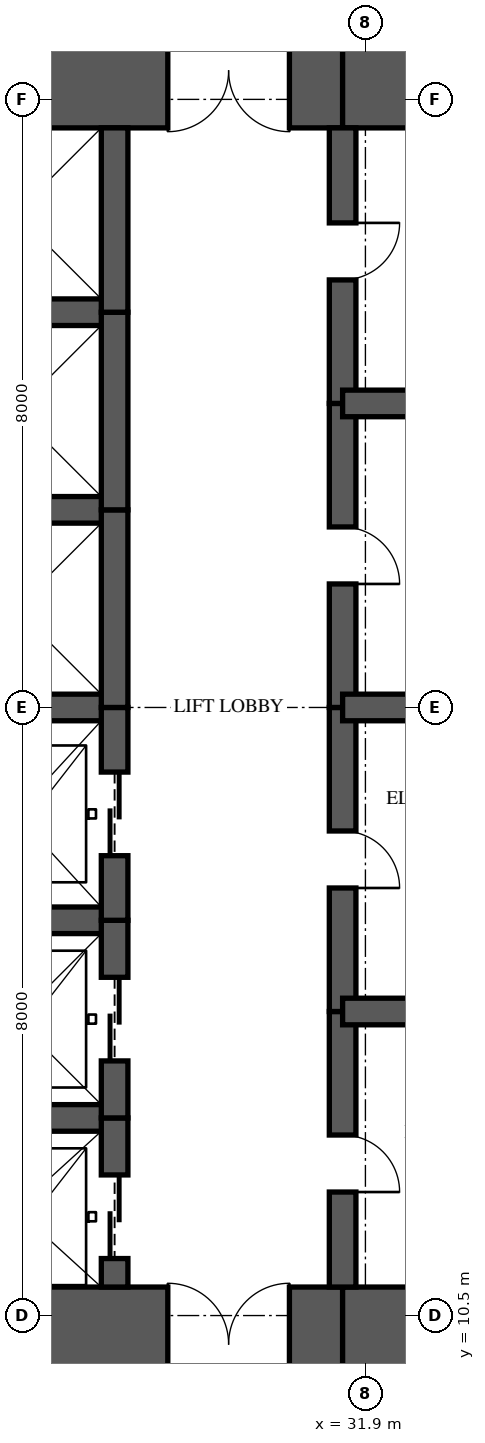
"""IFC4 building model, lengths in metres.
Left out: names, types, materials, properties, quantities, classifications, styles, units other than length and angle.
Written with IfcOpenShell. Run it as: python <this file> out.ifc"""

import sys

from ifc_helpers import new_model, si_unit, direction, frame, frame_2d, origin, place, context, subcontext, project, spatial, rectangle, extrude, element, fill, save


model = new_model("IFC4")
c1 = context("Model", 3, precision=1e-05, world=origin(), true_north=direction((0.0, 1.0)))
c2 = subcontext(c1, "Body", "Model", "MODEL_VIEW")
j1 = project(units=[si_unit("LENGTHUNIT", "METRE"), si_unit("PLANEANGLEUNIT", "RADIAN")], contexts=[c1])
p1 = place(None, origin())
s1 = spatial("IfcSite", under=j1, at=p1, CompositionType="ELEMENT")
p2 = place(p1, origin())
s2 = spatial("IfcBuilding", under=s1, at=p2, CompositionType="ELEMENT")
p3 = place(p2, frame((0.0, 0.0, 94.8)))
s3 = spatial("IfcBuildingStorey", under=s2, at=p3, CompositionType="ELEMENT", Elevation=94.8)
p4 = place(p3, frame((26.0, 10.125, 0.0), z_axis=(0.0, 0.0, 1.0), x_axis=(1.0, 0.0, 0.0)))
e1 = element("IfcWall", 1, at=p4, inside=s3, PredefinedType="SHEAR", context=c2, shape_type="SweptSolid", body=[
    extrude(rectangle(XDim=5.6, YDim=1.5, at=frame_2d((2.8, 0.0))), origin(), (0.0, 0.0, 1.0), 3.35),
])
p5 = place(p4, frame((3.3, 0.0, 0.0)))
e2 = element("IfcOpeningElement", 2, at=p5, cuts=e1, PredefinedType="OPENING", context=c2, shape_type="SweptSolid", body=[
    extrude(rectangle(XDim=1.6, YDim=2.1, at=frame_2d((0.8, 1.05))), frame((0.0, 0.76, 0.0), z_axis=(0.0, -1.0, 0.0), x_axis=(1.0, 0.0, 0.0)), (0.0, 0.0, 1.0), 1.52),
])
for number, where, z_axis, x_axis in (
    (3, (31.6, 10.125, 0.0), (0.0, 0.0, 1.0), (1.0, 0.0, 0.0)),
    (4, (35.9, 26.875, 0.0), (0.0, 0.0, 1.0), (-1.0, 0.0, 0.0)),
):
    element("IfcWall", number, at=place(p3, frame(where, z_axis=z_axis, x_axis=x_axis)), inside=s3, PredefinedType="SHEAR", context=c2, shape_type="SweptSolid", body=[
        extrude(rectangle(XDim=4.3, YDim=1.5, at=frame_2d((2.15, 0.0))), origin(), (0.0, 0.0, 1.0), 3.35),
    ])
p6 = place(p3, frame((31.6, 26.875, 0.0), z_axis=(0.0, 0.0, 1.0), x_axis=(-1.0, 0.0, 0.0)))
e5 = element("IfcWall", 5, at=p6, inside=s3, PredefinedType="SHEAR", context=c2, shape_type="SweptSolid", body=[
    extrude(rectangle(XDim=5.6, YDim=1.5, at=frame_2d((2.8, 0.0))), origin(), (0.0, 0.0, 1.0), 3.35),
])
p7 = place(p6, frame((0.7, 0.0, 0.0)))
e6 = element("IfcOpeningElement", 6, at=p7, cuts=e5, PredefinedType="OPENING", context=c2, shape_type="SweptSolid", body=[
    extrude(rectangle(XDim=1.6, YDim=2.1, at=frame_2d((0.8, 1.05))), frame((0.0, 0.76, 0.0), z_axis=(0.0, -1.0, 0.0), x_axis=(1.0, 0.0, 0.0)), (0.0, 0.0, 1.0), 1.52),
])
p8 = place(p3, frame((28.6, 10.875, 0.0), z_axis=(0.0, 0.0, 1.0), x_axis=(0.0, 1.0, 0.0)))
e7 = element("IfcWall", 7, at=p8, inside=s3, PredefinedType="SHEAR", context=c2, shape_type="SweptSolid", body=[
    extrude(rectangle(XDim=2.225, YDim=0.35, at=frame_2d((1.113, 0.0))), origin(), (0.0, 0.0, 1.0), 3.35),
])
p9 = place(p8, frame((0.375, 0.0, 0.0)))
e8 = element("IfcOpeningElement", 8, at=p9, cuts=e7, PredefinedType="OPENING", context=c2, shape_type="SweptSolid", body=[
    extrude(rectangle(XDim=1.1, YDim=2.1, at=frame_2d((0.55, 1.05))), frame((0.0, 0.185, 0.0), z_axis=(0.0, -1.0, 0.0), x_axis=(1.0, 0.0, 0.0)), (0.0, 0.0, 1.0), 0.37),
])
p10 = place(p3, frame((28.6, 13.1, 0.0), z_axis=(0.0, 0.0, 1.0), x_axis=(0.0, 1.0, 0.0)))
e9 = element("IfcWall", 9, at=p10, inside=s3, PredefinedType="SHEAR", context=c2, shape_type="SweptSolid", body=[
    extrude(rectangle(XDim=2.6, YDim=0.35, at=frame_2d((1.3, 0.0))), origin(), (0.0, 0.0, 1.0), 3.35),
])
p11 = place(p10, frame((0.75, 0.0, 0.0)))
e10 = element("IfcOpeningElement", 10, at=p11, cuts=e9, PredefinedType="OPENING", context=c2, shape_type="SweptSolid", body=[
    extrude(rectangle(XDim=1.1, YDim=2.1, at=frame_2d((0.55, 1.05))), frame((0.0, 0.185, 0.0), z_axis=(0.0, -1.0, 0.0), x_axis=(1.0, 0.0, 0.0)), (0.0, 0.0, 1.0), 0.37),
])
p12 = place(p3, frame((28.6, 15.7, 0.0), z_axis=(0.0, 0.0, 1.0), x_axis=(0.0, 1.0, 0.0)))
e11 = element("IfcWall", 11, at=p12, inside=s3, PredefinedType="SHEAR", context=c2, shape_type="SweptSolid", body=[
    extrude(rectangle(XDim=2.8, YDim=0.35, at=frame_2d((1.4, 0.0))), origin(), (0.0, 0.0, 1.0), 3.35),
])
p13 = place(p12, frame((0.85, 0.0, 0.0)))
e12 = element("IfcOpeningElement", 12, at=p13, cuts=e11, PredefinedType="OPENING", context=c2, shape_type="SweptSolid", body=[
    extrude(rectangle(XDim=1.1, YDim=2.1, at=frame_2d((0.55, 1.05))), frame((0.0, 0.185, 0.0), z_axis=(0.0, -1.0, 0.0), x_axis=(1.0, 0.0, 0.0)), (0.0, 0.0, 1.0), 0.37),
])
p14 = place(p3, frame((28.6, 18.5, 0.0), z_axis=(0.0, 0.0, 1.0), x_axis=(0.0, 1.0, 0.0)))
e13 = element("IfcWall", 13, at=p14, inside=s3, PredefinedType="SHEAR", context=c2, shape_type="SweptSolid", body=[
    extrude(rectangle(XDim=2.6, YDim=0.35, at=frame_2d((1.3, 0.0))), origin(), (0.0, 0.0, 1.0), 3.35),
])
p15 = place(p3, frame((28.6, 21.1, 0.0), z_axis=(0.0, 0.0, 1.0), x_axis=(0.0, 1.0, 0.0)))
e14 = element("IfcWall", 14, at=p15, inside=s3, PredefinedType="SHEAR", context=c2, shape_type="SweptSolid", body=[
    extrude(rectangle(XDim=2.6, YDim=0.35, at=frame_2d((1.3, 0.0))), origin(), (0.0, 0.0, 1.0), 3.35),
])
p16 = place(p3, frame((28.6, 23.7, 0.0), z_axis=(0.0, 0.0, 1.0), x_axis=(0.0, 1.0, 0.0)))
e15 = element("IfcWall", 15, at=p16, inside=s3, PredefinedType="SHEAR", context=c2, shape_type="SweptSolid", body=[
    extrude(rectangle(XDim=2.425, YDim=0.35, at=frame_2d((1.212, 0.0))), origin(), (0.0, 0.0, 1.0), 3.35),
])
p17 = place(p3, frame((31.6, 10.875, 0.0), z_axis=(0.0, 0.0, 1.0), x_axis=(0.0, 1.0, 0.0)))
e16 = element("IfcWall", 16, at=p17, inside=s3, PredefinedType="SHEAR", context=c2, shape_type="SweptSolid", body=[
    extrude(rectangle(XDim=3.625, YDim=0.35, at=frame_2d((1.812, 0.0))), origin(), (0.0, 0.0, 1.0), 3.35),
])
p18 = place(p17, frame((1.25, 0.0, 0.0)))
e17 = element("IfcOpeningElement", 17, at=p18, cuts=e16, PredefinedType="OPENING", context=c2, shape_type="SweptSolid", body=[
    extrude(rectangle(XDim=0.75, YDim=2.1, at=frame_2d((0.375, 1.05))), frame((0.0, 0.185, 0.0), z_axis=(0.0, -1.0, 0.0), x_axis=(1.0, 0.0, 0.0)), (0.0, 0.0, 1.0), 0.37),
])
p19 = place(p3, frame((31.6, 14.5, 0.0), z_axis=(0.0, 0.0, 1.0), x_axis=(0.0, 1.0, 0.0)))
e18 = element("IfcWall", 18, at=p19, inside=s3, PredefinedType="SHEAR", context=c2, shape_type="SweptSolid", body=[
    extrude(rectangle(XDim=4.0, YDim=0.35, at=frame_2d((2.0, 0.0))), origin(), (0.0, 0.0, 1.0), 3.35),
])
p20 = place(p19, frame((1.625, 0.0, 0.0)))
e19 = element("IfcOpeningElement", 19, at=p20, cuts=e18, PredefinedType="OPENING", context=c2, shape_type="SweptSolid", body=[
    extrude(rectangle(XDim=0.75, YDim=2.1, at=frame_2d((0.375, 1.05))), frame((0.0, 0.185, 0.0), z_axis=(0.0, -1.0, 0.0), x_axis=(1.0, 0.0, 0.0)), (0.0, 0.0, 1.0), 0.37),
])
p21 = place(p3, frame((31.6, 18.5, 0.0), z_axis=(0.0, 0.0, 1.0), x_axis=(0.0, 1.0, 0.0)))
e20 = element("IfcWall", 20, at=p21, inside=s3, PredefinedType="SHEAR", context=c2, shape_type="SweptSolid", body=[
    extrude(rectangle(XDim=4.0, YDim=0.35, at=frame_2d((2.0, 0.0))), origin(), (0.0, 0.0, 1.0), 3.35),
])
p22 = place(p21, frame((1.625, 0.0, 0.0)))
e21 = element("IfcOpeningElement", 21, at=p22, cuts=e20, PredefinedType="OPENING", context=c2, shape_type="SweptSolid", body=[
    extrude(rectangle(XDim=0.75, YDim=2.1, at=frame_2d((0.375, 1.05))), frame((0.0, 0.185, 0.0), z_axis=(0.0, -1.0, 0.0), x_axis=(1.0, 0.0, 0.0)), (0.0, 0.0, 1.0), 0.37),
])
p23 = place(p3, frame((31.6, 22.5, 0.0), z_axis=(0.0, 0.0, 1.0), x_axis=(0.0, 1.0, 0.0)))
e22 = element("IfcWall", 22, at=p23, inside=s3, PredefinedType="SHEAR", context=c2, shape_type="SweptSolid", body=[
    extrude(rectangle(XDim=3.625, YDim=0.35, at=frame_2d((1.812, 0.0))), origin(), (0.0, 0.0, 1.0), 3.35),
])
p24 = place(p23, frame((1.625, 0.0, 0.0)))
e23 = element("IfcOpeningElement", 23, at=p24, cuts=e22, PredefinedType="OPENING", context=c2, shape_type="SweptSolid", body=[
    extrude(rectangle(XDim=0.75, YDim=2.1, at=frame_2d((0.375, 1.05))), frame((0.0, 0.185, 0.0), z_axis=(0.0, -1.0, 0.0), x_axis=(1.0, 0.0, 0.0)), (0.0, 0.0, 1.0), 0.37),
])
for number, where, z_axis, x_axis in (
    (24, (26.0, 13.1, 0.0), (0.0, 0.0, 1.0), (1.0, 0.0, 0.0)),
    (25, (26.0, 15.7, 0.0), (0.0, 0.0, 1.0), (1.0, 0.0, 0.0)),
    (26, (26.0, 18.5, 0.0), (0.0, 0.0, 1.0), (1.0, 0.0, 0.0)),
    (27, (26.0, 21.1, 0.0), (0.0, 0.0, 1.0), (1.0, 0.0, 0.0)),
    (28, (26.0, 23.7, 0.0), (0.0, 0.0, 1.0), (1.0, 0.0, 0.0)),
):
    element("IfcWall", number, at=place(p3, frame(where, z_axis=z_axis, x_axis=x_axis)), inside=s3, PredefinedType="SHEAR", context=c2, shape_type="SweptSolid", body=[
        extrude(rectangle(XDim=2.6, YDim=0.35, at=frame_2d((1.3, 0.0))), origin(), (0.0, 0.0, 1.0), 3.35),
    ])
for number, where, z_axis, x_axis in (
    (29, (31.6, 14.5, 0.0), (0.0, 0.0, 1.0), (1.0, 0.0, 0.0)),
    (30, (31.6, 18.5, 0.0), (0.0, 0.0, 1.0), (1.0, 0.0, 0.0)),
    (31, (31.6, 22.5, 0.0), (0.0, 0.0, 1.0), (1.0, 0.0, 0.0)),
):
    element("IfcWall", number, at=place(p3, frame(where, z_axis=z_axis, x_axis=x_axis)), inside=s3, PredefinedType="SHEAR", context=c2, shape_type="SweptSolid", body=[
        extrude(rectangle(XDim=4.3, YDim=0.35, at=frame_2d((2.15, 0.0))), origin(), (0.0, 0.0, 1.0), 3.35),
    ])
p25 = place(p9, origin())
e32 = element("IfcDoor", 32, at=p25, inside=s3, OperationType="SLIDING_TO_LEFT", PredefinedType="DOOR", context=c2, shape_type="SweptSolid", body=[
    extrude(rectangle(XDim=1.1, YDim=2.1, at=frame_2d((0.55, 1.05))), frame((0.0, 0.025, 0.0), z_axis=(0.0, -1.0, 0.0), x_axis=(1.0, 0.0, 0.0)), (0.0, 0.0, 1.0), 0.05),
])
fill(e8, e32)
p26 = place(p11, origin())
e33 = element("IfcDoor", 33, at=p26, inside=s3, OperationType="SLIDING_TO_LEFT", PredefinedType="DOOR", context=c2, shape_type="SweptSolid", body=[
    extrude(rectangle(XDim=1.1, YDim=2.1, at=frame_2d((0.55, 1.05))), frame((0.0, 0.025, 0.0), z_axis=(0.0, -1.0, 0.0), x_axis=(1.0, 0.0, 0.0)), (0.0, 0.0, 1.0), 0.05),
])
fill(e10, e33)
p27 = place(p13, origin())
e34 = element("IfcDoor", 34, at=p27, inside=s3, OperationType="SLIDING_TO_LEFT", PredefinedType="DOOR", context=c2, shape_type="SweptSolid", body=[
    extrude(rectangle(XDim=1.1, YDim=2.1, at=frame_2d((0.55, 1.05))), frame((0.0, 0.025, 0.0), z_axis=(0.0, -1.0, 0.0), x_axis=(1.0, 0.0, 0.0)), (0.0, 0.0, 1.0), 0.05),
])
fill(e12, e34)
p28 = place(p5, origin())
e35 = element("IfcDoor", 35, at=p28, inside=s3, OperationType="DOUBLE_DOOR_SINGLE_SWING", PredefinedType="DOOR", context=c2, shape_type="SweptSolid", body=[
    extrude(rectangle(XDim=1.6, YDim=2.1, at=frame_2d((0.8, 1.05))), frame((0.0, 0.025, 0.0), z_axis=(0.0, -1.0, 0.0), x_axis=(1.0, 0.0, 0.0)), (0.0, 0.0, 1.0), 0.05),
])
fill(e2, e35)
p29 = place(p7, origin())
e36 = element("IfcDoor", 36, at=p29, inside=s3, OperationType="DOUBLE_DOOR_SINGLE_SWING", PredefinedType="DOOR", context=c2, shape_type="SweptSolid", body=[
    extrude(rectangle(XDim=1.6, YDim=2.1, at=frame_2d((0.8, 1.05))), frame((0.0, 0.025, 0.0), z_axis=(0.0, -1.0, 0.0), x_axis=(1.0, 0.0, 0.0)), (0.0, 0.0, 1.0), 0.05),
])
fill(e6, e36)
p30 = place(p18, frame((0.75, 0.0, 0.0), z_axis=(0.0, 0.0, 1.0), x_axis=(-1.0, 0.0, 0.0)))
e37 = element("IfcDoor", 37, at=p30, inside=s3, OperationType="SINGLE_SWING_RIGHT", PredefinedType="DOOR", context=c2, shape_type="SweptSolid", body=[
    extrude(rectangle(XDim=0.75, YDim=2.1, at=frame_2d((0.375, 1.05))), frame((0.0, 0.025, 0.0), z_axis=(0.0, -1.0, 0.0), x_axis=(1.0, 0.0, 0.0)), (0.0, 0.0, 1.0), 0.05),
])
fill(e17, e37)
p31 = place(p20, frame((0.75, 0.0, 0.0), z_axis=(0.0, 0.0, 1.0), x_axis=(-1.0, 0.0, 0.0)))
e38 = element("IfcDoor", 38, at=p31, inside=s3, OperationType="SINGLE_SWING_RIGHT", PredefinedType="DOOR", context=c2, shape_type="SweptSolid", body=[
    extrude(rectangle(XDim=0.75, YDim=2.1, at=frame_2d((0.375, 1.05))), frame((0.0, 0.025, 0.0), z_axis=(0.0, -1.0, 0.0), x_axis=(1.0, 0.0, 0.0)), (0.0, 0.0, 1.0), 0.05),
])
fill(e19, e38)
p32 = place(p22, frame((0.75, 0.0, 0.0), z_axis=(0.0, 0.0, 1.0), x_axis=(-1.0, 0.0, 0.0)))
e39 = element("IfcDoor", 39, at=p32, inside=s3, OperationType="SINGLE_SWING_RIGHT", PredefinedType="DOOR", context=c2, shape_type="SweptSolid", body=[
    extrude(rectangle(XDim=0.75, YDim=2.1, at=frame_2d((0.375, 1.05))), frame((0.0, 0.025, 0.0), z_axis=(0.0, -1.0, 0.0), x_axis=(1.0, 0.0, 0.0)), (0.0, 0.0, 1.0), 0.05),
])
fill(e21, e39)
p33 = place(p24, frame((0.75, 0.0, 0.0), z_axis=(0.0, 0.0, 1.0), x_axis=(-1.0, 0.0, 0.0)))
e40 = element("IfcDoor", 40, at=p33, inside=s3, OperationType="SINGLE_SWING_LEFT", PredefinedType="DOOR", context=c2, shape_type="SweptSolid", body=[
    extrude(rectangle(XDim=0.75, YDim=2.1, at=frame_2d((0.375, 1.05))), frame((0.0, 0.025, 0.0), z_axis=(0.0, -1.0, 0.0), x_axis=(1.0, 0.0, 0.0)), (0.0, 0.0, 1.0), 0.05),
])
fill(e23, e40)
save(model, sys.argv[1])
